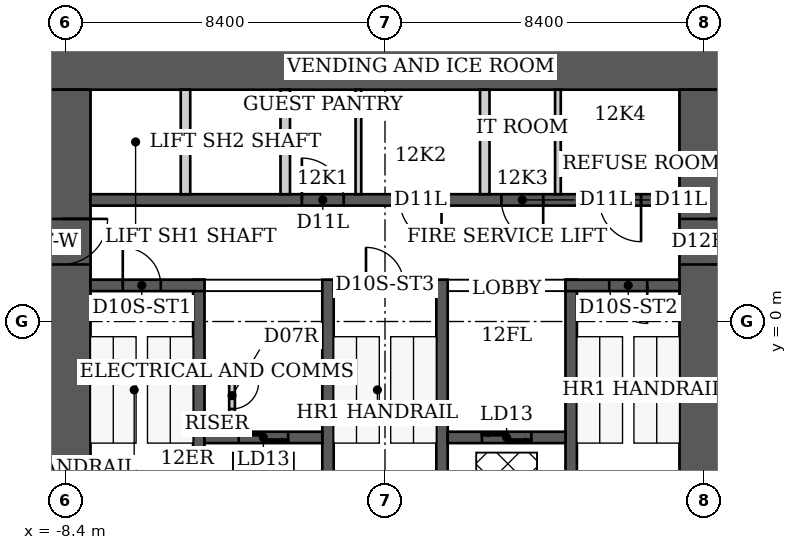
"""IFC4 building model, lengths in metres.
Left out: names, types, materials, properties, quantities, classifications, styles, units other than length and angle.
Written with IfcOpenShell. Run it as: python <this file> out.ifc"""

import sys

from ifc_helpers import new_model, si_unit, direction, frame, frame_2d, origin, place, context, subcontext, project, spatial, rectangle, extrude, element, fill, save


model = new_model("IFC4")
c1 = context("Model", 3, precision=1e-05, world=origin(), true_north=direction((0.0, 1.0)))
c2 = subcontext(c1, "Body", "Model", "MODEL_VIEW")
j1 = project(units=[si_unit("LENGTHUNIT", "METRE"), si_unit("PLANEANGLEUNIT", "RADIAN")], contexts=[c1])
p1 = place(None, origin())
s1 = spatial("IfcSite", under=j1, at=p1, CompositionType="ELEMENT")
p2 = place(p1, origin())
s2 = spatial("IfcBuilding", under=s1, at=p2, CompositionType="ELEMENT")
p3 = place(p2, frame((0.0, 0.0, 53.4)))
s3 = spatial("IfcBuildingStorey", under=s2, at=p3, CompositionType="ELEMENT", Elevation=53.4)
p4 = place(p3, frame((-9.25, 6.85, 0.0), z_axis=(0.0, 0.0, 1.0), x_axis=(1.0, 0.0, 0.0)))
e1 = element("IfcWall", 1, at=p4, inside=s3, PredefinedType="SHEAR", context=c2, shape_type="SweptSolid", body=[
    extrude(rectangle(XDim=18.5, YDim=1.5, at=frame_2d((9.25, 0.0))), origin(), (0.0, 0.0, 1.0), 3.8),
])
p5 = place(p3, frame((-8.5, -9.2, 0.0), z_axis=(0.0, 0.0, 1.0), x_axis=(0.0, 1.0, 0.0)))
e2 = element("IfcWall", 2, at=p5, inside=s3, PredefinedType="SHEAR", context=c2, shape_type="SweptSolid", body=[
    extrude(rectangle(XDim=15.3, YDim=1.5, at=frame_2d((7.65, 0.0))), origin(), (0.0, 0.0, 1.0), 3.8),
])
p6 = place(p5, frame((10.7, 0.0, 0.0)))
e3 = element("IfcOpeningElement", 3, at=p6, cuts=e2, PredefinedType="OPENING", context=c2, shape_type="SweptSolid", body=[
    extrude(rectangle(XDim=1.2, YDim=2.2, at=frame_2d((0.6, 1.1))), frame((0.0, 0.75, 0.0), z_axis=(0.0, -1.0, 0.0), x_axis=(1.0, 0.0, 0.0)), (0.0, 0.0, 1.0), 1.5),
])
p7 = place(p3, frame((8.5, -9.2, 0.0), z_axis=(0.0, 0.0, 1.0), x_axis=(0.0, 1.0, 0.0)))
e4 = element("IfcWall", 4, at=p7, inside=s3, PredefinedType="SHEAR", context=c2, shape_type="SweptSolid", body=[
    extrude(rectangle(XDim=15.3, YDim=1.5, at=frame_2d((7.65, 0.0))), origin(), (0.0, 0.0, 1.0), 3.8),
])
p8 = place(p7, frame((10.7, 0.0, 0.0)))
e5 = element("IfcOpeningElement", 5, at=p8, cuts=e4, PredefinedType="OPENING", context=c2, shape_type="SweptSolid", body=[
    extrude(rectangle(XDim=1.2, YDim=2.2, at=frame_2d((0.6, 1.1))), frame((0.0, 0.75, 0.0), z_axis=(0.0, -1.0, 0.0), x_axis=(1.0, 0.0, 0.0)), (0.0, 0.0, 1.0), 1.5),
])
for number, where, z_axis, x_axis in (
    (6, (-4.9, -6.1, 0.0), (0.0, 0.0, 1.0), (0.0, 1.0, 0.0)),
    (7, (-1.5, -6.1, 0.0), (0.0, 0.0, 1.0), (0.0, 1.0, 0.0)),
    (8, (1.5, -6.1, 0.0), (0.0, 0.0, 1.0), (0.0, 1.0, 0.0)),
    (9, (4.9, -6.1, 0.0), (0.0, 0.0, 1.0), (0.0, 1.0, 0.0)),
):
    element("IfcWall", number, at=place(p3, frame(where, z_axis=z_axis, x_axis=x_axis)), inside=s3, PredefinedType="SHEAR", context=c2, shape_type="SweptSolid", body=[
        extrude(rectangle(XDim=7.2, YDim=0.3, at=frame_2d((3.6, 0.0))), origin(), (0.0, 0.0, 1.0), 3.8),
    ])
p9 = place(p3, frame((-7.75, 0.95, 0.0), z_axis=(0.0, 0.0, 1.0), x_axis=(1.0, 0.0, 0.0)))
e10 = element("IfcWall", 10, at=p9, inside=s3, PredefinedType="SHEAR", context=c2, shape_type="SweptSolid", body=[
    extrude(rectangle(XDim=3.0, YDim=0.3, at=frame_2d((1.5, 0.0))), origin(), (0.0, 0.0, 1.0), 3.8),
])
p10 = place(p9, frame((0.85, 0.0, 0.0)))
e11 = element("IfcOpeningElement", 11, at=p10, cuts=e10, PredefinedType="OPENING", context=c2, shape_type="SweptSolid", body=[
    extrude(rectangle(XDim=1.0, YDim=2.2, at=frame_2d((0.5, 1.1))), frame((0.0, 0.15, 0.0), z_axis=(0.0, -1.0, 0.0), x_axis=(1.0, 0.0, 0.0)), (0.0, 0.0, 1.0), 0.3),
])
p11 = place(p3, frame((-1.35, 0.95, 0.0), z_axis=(0.0, 0.0, 1.0), x_axis=(1.0, 0.0, 0.0)))
e12 = element("IfcWall", 12, at=p11, inside=s3, PredefinedType="SHEAR", context=c2, shape_type="SweptSolid", body=[
    extrude(rectangle(XDim=2.7, YDim=0.3, at=frame_2d((1.35, 0.0))), origin(), (0.0, 0.0, 1.0), 3.8),
])
p12 = place(p11, frame((0.85, 0.0, 0.0)))
e13 = element("IfcOpeningElement", 13, at=p12, cuts=e12, PredefinedType="OPENING", context=c2, shape_type="SweptSolid", body=[
    extrude(rectangle(XDim=1.0, YDim=2.2, at=frame_2d((0.5, 1.1))), frame((0.0, 0.15, 0.0), z_axis=(0.0, -1.0, 0.0), x_axis=(1.0, 0.0, 0.0)), (0.0, 0.0, 1.0), 0.3),
])
p13 = place(p3, frame((4.75, 0.95, 0.0), z_axis=(0.0, 0.0, 1.0), x_axis=(1.0, 0.0, 0.0)))
e14 = element("IfcWall", 14, at=p13, inside=s3, PredefinedType="SHEAR", context=c2, shape_type="SweptSolid", body=[
    extrude(rectangle(XDim=3.0, YDim=0.3, at=frame_2d((1.5, 0.0))), origin(), (0.0, 0.0, 1.0), 3.8),
])
p14 = place(p13, frame((1.15, 0.0, 0.0)))
e15 = element("IfcOpeningElement", 15, at=p14, cuts=e14, PredefinedType="OPENING", context=c2, shape_type="SweptSolid", body=[
    extrude(rectangle(XDim=1.0, YDim=2.2, at=frame_2d((0.5, 1.1))), frame((0.0, 0.15, 0.0), z_axis=(0.0, -1.0, 0.0), x_axis=(1.0, 0.0, 0.0)), (0.0, 0.0, 1.0), 0.3),
])
p15 = place(p3, frame((-4.75, -3.05, 0.0), z_axis=(0.0, 0.0, 1.0), x_axis=(1.0, 0.0, 0.0)))
e16 = element("IfcWall", 16, at=p15, inside=s3, PredefinedType="SHEAR", context=c2, shape_type="SweptSolid", body=[
    extrude(rectangle(XDim=3.1, YDim=0.3, at=frame_2d((1.55, 0.0))), origin(), (0.0, 0.0, 1.0), 3.8),
])
p16 = place(p15, frame((0.9, 0.0, 0.0)))
e17 = element("IfcOpeningElement", 17, at=p16, cuts=e16, PredefinedType="OPENING", context=c2, shape_type="SweptSolid", body=[
    extrude(rectangle(XDim=1.3, YDim=2.1, at=frame_2d((0.65, 1.05))), frame((0.0, 0.15, 0.0), z_axis=(0.0, -1.0, 0.0), x_axis=(1.0, 0.0, 0.0)), (0.0, 0.0, 1.0), 0.3),
])
p17 = place(p3, frame((1.65, -3.05, 0.0), z_axis=(0.0, 0.0, 1.0), x_axis=(1.0, 0.0, 0.0)))
e18 = element("IfcWall", 18, at=p17, inside=s3, PredefinedType="SHEAR", context=c2, shape_type="SweptSolid", body=[
    extrude(rectangle(XDim=3.1, YDim=0.3, at=frame_2d((1.55, 0.0))), origin(), (0.0, 0.0, 1.0), 3.8),
])
p18 = place(p17, frame((0.9, 0.0, 0.0)))
e19 = element("IfcOpeningElement", 19, at=p18, cuts=e18, PredefinedType="OPENING", context=c2, shape_type="SweptSolid", body=[
    extrude(rectangle(XDim=1.3, YDim=2.1, at=frame_2d((0.65, 1.05))), frame((0.0, 0.15, 0.0), z_axis=(0.0, -1.0, 0.0), x_axis=(1.0, 0.0, 0.0)), (0.0, 0.0, 1.0), 0.3),
])
p19 = place(p3, frame((-7.75, 3.2, 0.0), z_axis=(0.0, 0.0, 1.0), x_axis=(1.0, 0.0, 0.0)))
e20 = element("IfcWall", 20, at=p19, inside=s3, PredefinedType="SHEAR", context=c2, shape_type="SweptSolid", body=[
    extrude(rectangle(XDim=15.5, YDim=0.3, at=frame_2d((7.75, 0.0))), origin(), (0.0, 0.0, 1.0), 3.8),
])
p20 = place(p19, frame((5.562, 0.0, 0.0)))
e21 = element("IfcOpeningElement", 21, at=p20, cuts=e20, PredefinedType="OPENING", context=c2, shape_type="SweptSolid", body=[
    extrude(rectangle(XDim=1.1, YDim=2.2, at=frame_2d((0.55, 1.1))), frame((0.0, 0.15, 0.0), z_axis=(0.0, -1.0, 0.0), x_axis=(1.0, 0.0, 0.0)), (0.0, 0.0, 1.0), 0.3),
])
p21 = place(p19, frame((8.137, 0.0, 0.0)))
e22 = element("IfcOpeningElement", 22, at=p21, cuts=e20, PredefinedType="OPENING", context=c2, shape_type="SweptSolid", body=[
    extrude(rectangle(XDim=1.1, YDim=2.2, at=frame_2d((0.55, 1.1))), frame((0.0, 0.15, 0.0), z_axis=(0.0, -1.0, 0.0), x_axis=(1.0, 0.0, 0.0)), (0.0, 0.0, 1.0), 0.3),
])
p22 = place(p19, frame((10.812, 0.0, 0.0)))
e23 = element("IfcOpeningElement", 23, at=p22, cuts=e20, PredefinedType="OPENING", context=c2, shape_type="SweptSolid", body=[
    extrude(rectangle(XDim=1.1, YDim=2.2, at=frame_2d((0.55, 1.1))), frame((0.0, 0.15, 0.0), z_axis=(0.0, -1.0, 0.0), x_axis=(1.0, 0.0, 0.0)), (0.0, 0.0, 1.0), 0.3),
])
p23 = place(p19, frame((13.387, 0.0, 0.0)))
e24 = element("IfcOpeningElement", 24, at=p23, cuts=e20, PredefinedType="OPENING", context=c2, shape_type="SweptSolid", body=[
    extrude(rectangle(XDim=1.1, YDim=2.2, at=frame_2d((0.55, 1.1))), frame((0.0, 0.15, 0.0), z_axis=(0.0, -1.0, 0.0), x_axis=(1.0, 0.0, 0.0)), (0.0, 0.0, 1.0), 0.3),
])
for number, where, z_axis, x_axis in (
    (25, (-5.25, 3.35, 0.0), (0.0, 0.0, 1.0), (0.0, 1.0, 0.0)),
    (26, (-2.625, 3.35, 0.0), (0.0, 0.0, 1.0), (0.0, 1.0, 0.0)),
    (27, (2.625, 3.35, 0.0), (0.0, 0.0, 1.0), (0.0, 1.0, 0.0)),
):
    element("IfcWall", number, at=place(p3, frame(where, z_axis=z_axis, x_axis=x_axis)), inside=s3, PredefinedType="PARTITIONING", context=c2, shape_type="SweptSolid", body=[
        extrude(rectangle(XDim=2.75, YDim=0.25, at=frame_2d((1.375, 0.0))), origin(), (0.0, 0.0, 1.0), 3.8),
    ])
p24 = place(p3, frame((-4.025, -2.9, 0.0), z_axis=(0.0, 0.0, 1.0), x_axis=(0.0, 1.0, 0.0)))
e28 = element("IfcWall", 28, at=p24, inside=s3, PredefinedType="PARTITIONING", context=c2, shape_type="SweptSolid", body=[
    extrude(rectangle(XDim=1.775, YDim=0.15, at=frame_2d((0.887, 0.0))), origin(), (0.0, 0.0, 1.0), 3.64),
])
p25 = place(p24, frame((0.6, 0.0, 0.0)))
e29 = element("IfcOpeningElement", 29, at=p25, cuts=e28, PredefinedType="OPENING", context=c2, shape_type="SweptSolid", body=[
    extrude(rectangle(XDim=0.7, YDim=2.1, at=frame_2d((0.35, 1.05))), frame((0.0, 0.075, 0.0), z_axis=(0.0, -1.0, 0.0), x_axis=(1.0, 0.0, 0.0)), (0.0, 0.0, 1.0), 0.15),
])
p26 = place(p3, frame((-4.75, -1.2, 0.0), z_axis=(0.0, 0.0, 1.0), x_axis=(1.0, 0.0, 0.0)))
e30 = element("IfcWall", 30, at=p26, inside=s3, PredefinedType="PARTITIONING", context=c2, shape_type="SweptSolid", body=[
    extrude(rectangle(XDim=0.8, YDim=0.15, at=frame_2d((0.4, 0.0))), origin(), (0.0, 0.0, 1.0), 3.64),
])
for number, where, z_axis, x_axis in (
    (31, (-0.7, 3.35, 0.0), (0.0, 0.0, 1.0), (0.0, 1.0, 0.0)),
    (32, (4.55, 3.35, 0.0), (0.0, 0.0, 1.0), (0.0, 1.0, 0.0)),
):
    element("IfcWall", number, at=place(p3, frame(where, z_axis=z_axis, x_axis=x_axis)), inside=s3, PredefinedType="PARTITIONING", context=c2, shape_type="SweptSolid", body=[
        extrude(rectangle(XDim=2.75, YDim=0.15, at=frame_2d((1.375, 0.0))), origin(), (0.0, 0.0, 1.0), 3.64),
    ])
p27 = place(p10, origin())
e33 = element("IfcDoor", 33, at=p27, inside=s3, OperationType="SINGLE_SWING_LEFT", PredefinedType="DOOR", context=c2, shape_type="SweptSolid", body=[
    extrude(rectangle(XDim=1.0, YDim=2.2, at=frame_2d((0.5, 1.1))), frame((0.0, 0.025, 0.0), z_axis=(0.0, -1.0, 0.0), x_axis=(1.0, 0.0, 0.0)), (0.0, 0.0, 1.0), 0.05),
])
fill(e11, e33)
p28 = place(p12, origin())
e34 = element("IfcDoor", 34, at=p28, inside=s3, OperationType="SINGLE_SWING_LEFT", PredefinedType="DOOR", context=c2, shape_type="SweptSolid", body=[
    extrude(rectangle(XDim=1.0, YDim=2.2, at=frame_2d((0.5, 1.1))), frame((0.0, 0.025, 0.0), z_axis=(0.0, -1.0, 0.0), x_axis=(1.0, 0.0, 0.0)), (0.0, 0.0, 1.0), 0.05),
])
fill(e13, e34)
p29 = place(p14, origin())
e35 = element("IfcDoor", 35, at=p29, inside=s3, OperationType="SINGLE_SWING_RIGHT", PredefinedType="DOOR", context=c2, shape_type="SweptSolid", body=[
    extrude(rectangle(XDim=1.0, YDim=2.2, at=frame_2d((0.5, 1.1))), frame((0.0, 0.025, 0.0), z_axis=(0.0, -1.0, 0.0), x_axis=(1.0, 0.0, 0.0)), (0.0, 0.0, 1.0), 0.05),
])
fill(e15, e35)
p30 = place(p6, origin())
e36 = element("IfcDoor", 36, at=p30, inside=s3, OperationType="SINGLE_SWING_RIGHT", PredefinedType="DOOR", context=c2, shape_type="SweptSolid", body=[
    extrude(rectangle(XDim=1.2, YDim=2.2, at=frame_2d((0.6, 1.1))), frame((0.0, 0.025, 0.0), z_axis=(0.0, -1.0, 0.0), x_axis=(1.0, 0.0, 0.0)), (0.0, 0.0, 1.0), 0.05),
])
fill(e3, e36)
p31 = place(p8, origin())
e37 = element("IfcDoor", 37, at=p31, inside=s3, OperationType="SINGLE_SWING_RIGHT", PredefinedType="DOOR", context=c2, shape_type="SweptSolid", body=[
    extrude(rectangle(XDim=1.2, YDim=2.2, at=frame_2d((0.6, 1.1))), frame((0.0, 0.025, 0.0), z_axis=(0.0, -1.0, 0.0), x_axis=(1.0, 0.0, 0.0)), (0.0, 0.0, 1.0), 0.05),
])
fill(e5, e37)
p32 = place(p25, origin())
e38 = element("IfcDoor", 38, at=p32, inside=s3, OperationType="SINGLE_SWING_RIGHT", PredefinedType="DOOR", context=c2, shape_type="SweptSolid", body=[
    extrude(rectangle(XDim=0.7, YDim=2.1, at=frame_2d((0.35, 1.05))), frame((0.0, 0.025, 0.0), z_axis=(0.0, -1.0, 0.0), x_axis=(1.0, 0.0, 0.0)), (0.0, 0.0, 1.0), 0.05),
])
fill(e29, e38)
p33 = place(p20, origin())
e39 = element("IfcDoor", 39, at=p33, inside=s3, OperationType="SINGLE_SWING_LEFT", PredefinedType="DOOR", context=c2, shape_type="SweptSolid", body=[
    extrude(rectangle(XDim=1.1, YDim=2.2, at=frame_2d((0.55, 1.1))), frame((0.0, 0.025, 0.0), z_axis=(0.0, -1.0, 0.0), x_axis=(1.0, 0.0, 0.0)), (0.0, 0.0, 1.0), 0.05),
])
fill(e21, e39)
p34 = place(p21, origin())
e40 = element("IfcDoor", 40, at=p34, inside=s3, OperationType="SINGLE_SWING_RIGHT", PredefinedType="DOOR", context=c2, shape_type="SweptSolid", body=[
    extrude(rectangle(XDim=1.1, YDim=2.2, at=frame_2d((0.55, 1.1))), frame((0.0, 0.025, 0.0), z_axis=(0.0, -1.0, 0.0), x_axis=(1.0, 0.0, 0.0)), (0.0, 0.0, 1.0), 0.05),
])
fill(e22, e40)
p35 = place(p22, origin())
e41 = element("IfcDoor", 41, at=p35, inside=s3, OperationType="SINGLE_SWING_RIGHT", PredefinedType="DOOR", context=c2, shape_type="SweptSolid", body=[
    extrude(rectangle(XDim=1.1, YDim=2.2, at=frame_2d((0.55, 1.1))), frame((0.0, 0.025, 0.0), z_axis=(0.0, -1.0, 0.0), x_axis=(1.0, 0.0, 0.0)), (0.0, 0.0, 1.0), 0.05),
])
fill(e23, e41)
p36 = place(p23, origin())
e42 = element("IfcDoor", 42, at=p36, inside=s3, OperationType="SINGLE_SWING_RIGHT", PredefinedType="DOOR", context=c2, shape_type="SweptSolid", body=[
    extrude(rectangle(XDim=1.1, YDim=2.2, at=frame_2d((0.55, 1.1))), frame((0.0, 0.025, 0.0), z_axis=(0.0, -1.0, 0.0), x_axis=(1.0, 0.0, 0.0)), (0.0, 0.0, 1.0), 0.05),
])
fill(e24, e42)
p37 = place(p16, origin())
e43 = element("IfcDoor", 43, at=p37, inside=s3, OperationType="DOUBLE_DOOR_SLIDING", PredefinedType="DOOR", context=c2, shape_type="SweptSolid", body=[
    extrude(rectangle(XDim=1.3, YDim=2.1, at=frame_2d((0.65, 1.05))), frame((0.0, 0.025, 0.0), z_axis=(0.0, -1.0, 0.0), x_axis=(1.0, 0.0, 0.0)), (0.0, 0.0, 1.0), 0.05),
])
fill(e17, e43)
p38 = place(p18, origin())
e44 = element("IfcDoor", 44, at=p38, inside=s3, OperationType="DOUBLE_DOOR_SLIDING", PredefinedType="DOOR", context=c2, shape_type="SweptSolid", body=[
    extrude(rectangle(XDim=1.3, YDim=2.1, at=frame_2d((0.65, 1.05))), frame((0.0, 0.025, 0.0), z_axis=(0.0, -1.0, 0.0), x_axis=(1.0, 0.0, 0.0)), (0.0, 0.0, 1.0), 0.05),
])
fill(e19, e44)
save(model, sys.argv[1])
